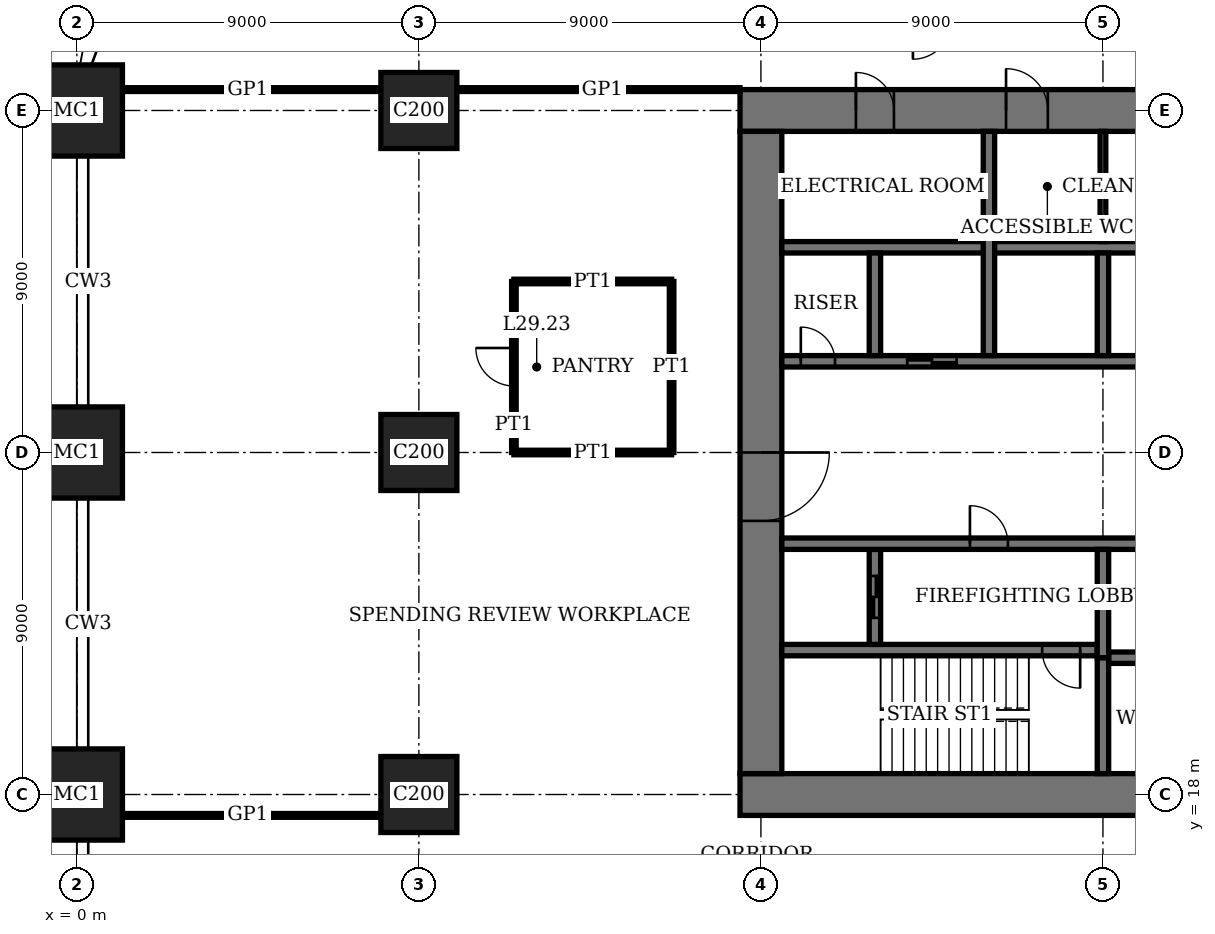
"""IFC4 building model, lengths in metres.
Left out: names, types, materials, properties, quantities, classifications, styles, units other than length and angle.
Written with IfcOpenShell. Run it as: python <this file> out.ifc"""

import sys

from ifc_helpers import new_model, si_unit, direction, frame, frame_2d, origin, origin_2d, place, context, subcontext, project, spatial, rectangle, extrude, element, fill, save


model = new_model("IFC4")
c1 = context("Model", 3, precision=1e-05, world=origin(), true_north=direction((0.0, 1.0)))
c2 = subcontext(c1, "Body", "Model", "MODEL_VIEW")
j1 = project(units=[si_unit("LENGTHUNIT", "METRE"), si_unit("PLANEANGLEUNIT", "RADIAN")], contexts=[c1])
p1 = place(None, origin())
s1 = spatial("IfcSite", under=j1, at=p1, CompositionType="ELEMENT")
p2 = place(p1, origin())
s2 = spatial("IfcBuilding", under=s1, at=p2, CompositionType="ELEMENT")
p3 = place(p2, frame((0.0, 0.0, 121.0)))
s3 = spatial("IfcBuildingStorey", under=s2, at=p3, CompositionType="ELEMENT", Elevation=121.0)
for number, where, z_axis, x_axis in (
    (1, (0.0, 18.0, 0.0), (0.0, 0.0, 1.0), (1.0, 0.0, 0.0)),
    (2, (0.0, 27.0, 0.0), (0.0, 0.0, 1.0), (1.0, 0.0, 0.0)),
    (3, (0.0, 36.0, 0.0), (0.0, 0.0, 1.0), (1.0, 0.0, 0.0)),
):
    element("IfcColumn", number, at=place(p3, frame(where, z_axis=z_axis, x_axis=x_axis)), inside=s3, PredefinedType="COLUMN", context=c2, shape_type="SweptSolid", body=[
        extrude(rectangle(XDim=2.4, YDim=2.4, at=origin_2d()), origin(), (0.0, 0.0, 1.0), 4.0),
    ])
for number, where, z_axis, x_axis in (
    (4, (9.0, 18.0, 0.0), (0.0, 0.0, 1.0), (1.0, 0.0, 0.0)),
    (5, (9.0, 27.0, 0.0), (0.0, 0.0, 1.0), (1.0, 0.0, 0.0)),
    (6, (9.0, 36.0, 0.0), (0.0, 0.0, 1.0), (1.0, 0.0, 0.0)),
):
    element("IfcColumn", number, at=place(p3, frame(where, z_axis=z_axis, x_axis=x_axis)), inside=s3, PredefinedType="COLUMN", context=c2, shape_type="SweptSolid", body=[
        extrude(rectangle(XDim=2.0, YDim=2.0, at=origin_2d()), origin(), (0.0, 0.0, 1.0), 4.0),
    ])
p4 = place(p3, frame((17.45, 18.0, 0.0), z_axis=(0.0, 0.0, 1.0), x_axis=(1.0, 0.0, 0.0)))
e7 = element("IfcWall", 7, at=p4, inside=s3, PredefinedType="SHEAR", context=c2, shape_type="SweptSolid", body=[
    extrude(rectangle(XDim=28.1, YDim=1.1, at=frame_2d((14.05, 0.0))), origin(), (0.0, 0.0, 1.0), 4.0),
])
p5 = place(p4, frame((11.55, 0.0, 0.0)))
e8 = element("IfcOpeningElement", 8, at=p5, cuts=e7, PredefinedType="OPENING", context=c2, shape_type="SweptSolid", body=[
    extrude(rectangle(XDim=1.0, YDim=2.4, at=frame_2d((0.5, 1.2))), frame((0.0, 0.56, 0.0), z_axis=(0.0, -1.0, 0.0), x_axis=(1.0, 0.0, 0.0)), (0.0, 0.0, 1.0), 1.12),
])
p6 = place(p4, frame((16.55, 0.0, 0.0)))
e9 = element("IfcOpeningElement", 9, at=p6, cuts=e7, PredefinedType="OPENING", context=c2, shape_type="SweptSolid", body=[
    extrude(rectangle(XDim=1.0, YDim=2.4, at=frame_2d((0.5, 1.2))), frame((0.0, 0.56, 0.0), z_axis=(0.0, -1.0, 0.0), x_axis=(1.0, 0.0, 0.0)), (0.0, 0.0, 1.0), 1.12),
])
p7 = place(p4, frame((20.0, 0.0, 0.0)))
e10 = element("IfcOpeningElement", 10, at=p7, cuts=e7, PredefinedType="OPENING", context=c2, shape_type="SweptSolid", body=[
    extrude(rectangle(XDim=1.1, YDim=2.4, at=frame_2d((0.55, 1.2))), frame((0.0, 0.56, 0.0), z_axis=(0.0, -1.0, 0.0), x_axis=(1.0, 0.0, 0.0)), (0.0, 0.0, 1.0), 1.12),
])
p8 = place(p4, frame((24.05, 0.0, 0.0)))
e11 = element("IfcOpeningElement", 11, at=p8, cuts=e7, PredefinedType="OPENING", context=c2, shape_type="SweptSolid", body=[
    extrude(rectangle(XDim=1.0, YDim=2.4, at=frame_2d((0.5, 1.2))), frame((0.0, 0.56, 0.0), z_axis=(0.0, -1.0, 0.0), x_axis=(1.0, 0.0, 0.0)), (0.0, 0.0, 1.0), 1.12),
])
p9 = place(p3, frame((45.55, 36.0, 0.0), z_axis=(0.0, 0.0, 1.0), x_axis=(-1.0, 0.0, 0.0)))
e12 = element("IfcWall", 12, at=p9, inside=s3, PredefinedType="SHEAR", context=c2, shape_type="SweptSolid", body=[
    extrude(rectangle(XDim=28.1, YDim=1.1, at=frame_2d((14.05, 0.0))), origin(), (0.0, 0.0, 1.0), 4.0),
])
p10 = place(p9, frame((11.55, 0.0, 0.0)))
e13 = element("IfcOpeningElement", 13, at=p10, cuts=e12, PredefinedType="OPENING", context=c2, shape_type="SweptSolid", body=[
    extrude(rectangle(XDim=1.0, YDim=2.4, at=frame_2d((0.5, 1.2))), frame((0.0, 0.56, 0.0), z_axis=(0.0, -1.0, 0.0), x_axis=(1.0, 0.0, 0.0)), (0.0, 0.0, 1.0), 1.12),
])
p11 = place(p9, frame((16.55, 0.0, 0.0)))
e14 = element("IfcOpeningElement", 14, at=p11, cuts=e12, PredefinedType="OPENING", context=c2, shape_type="SweptSolid", body=[
    extrude(rectangle(XDim=1.0, YDim=2.4, at=frame_2d((0.5, 1.2))), frame((0.0, 0.56, 0.0), z_axis=(0.0, -1.0, 0.0), x_axis=(1.0, 0.0, 0.0)), (0.0, 0.0, 1.0), 1.12),
])
p12 = place(p9, frame((20.0, 0.0, 0.0)))
e15 = element("IfcOpeningElement", 15, at=p12, cuts=e12, PredefinedType="OPENING", context=c2, shape_type="SweptSolid", body=[
    extrude(rectangle(XDim=1.1, YDim=2.4, at=frame_2d((0.55, 1.2))), frame((0.0, 0.56, 0.0), z_axis=(0.0, -1.0, 0.0), x_axis=(1.0, 0.0, 0.0)), (0.0, 0.0, 1.0), 1.12),
])
p13 = place(p9, frame((24.05, 0.0, 0.0)))
e16 = element("IfcOpeningElement", 16, at=p13, cuts=e12, PredefinedType="OPENING", context=c2, shape_type="SweptSolid", body=[
    extrude(rectangle(XDim=1.0, YDim=2.4, at=frame_2d((0.5, 1.2))), frame((0.0, 0.56, 0.0), z_axis=(0.0, -1.0, 0.0), x_axis=(1.0, 0.0, 0.0)), (0.0, 0.0, 1.0), 1.12),
])
p14 = place(p3, frame((18.0, 35.45, 0.0), z_axis=(0.0, 0.0, 1.0), x_axis=(0.0, -1.0, 0.0)))
e17 = element("IfcWall", 17, at=p14, inside=s3, PredefinedType="SHEAR", context=c2, shape_type="SweptSolid", body=[
    extrude(rectangle(XDim=16.9, YDim=1.1, at=frame_2d((8.45, 0.0))), origin(), (0.0, 0.0, 1.0), 4.0),
])
p15 = place(p14, frame((8.45, 0.0, 0.0)))
e18 = element("IfcOpeningElement", 18, at=p15, cuts=e17, PredefinedType="OPENING", context=c2, shape_type="SweptSolid", body=[
    extrude(rectangle(XDim=1.8, YDim=2.4, at=frame_2d((0.9, 1.2))), frame((0.0, 0.56, 0.0), z_axis=(0.0, -1.0, 0.0), x_axis=(1.0, 0.0, 0.0)), (0.0, 0.0, 1.0), 1.12),
])
p16 = place(p3, frame((18.55, 21.8, 0.0), z_axis=(0.0, 0.0, 1.0), x_axis=(1.0, 0.0, 0.0)))
e19 = element("IfcWall", 19, at=p16, inside=s3, PredefinedType="SHEAR", context=c2, shape_type="SweptSolid", body=[
    extrude(rectangle(XDim=8.3, YDim=0.3, at=frame_2d((4.15, 0.0))), origin(), (0.0, 0.0, 1.0), 4.0),
])
p17 = place(p16, frame((6.85, 0.0, 0.0)))
e20 = element("IfcOpeningElement", 20, at=p17, cuts=e19, PredefinedType="OPENING", context=c2, shape_type="SweptSolid", body=[
    extrude(rectangle(XDim=1.0, YDim=2.4, at=frame_2d((0.5, 1.2))), frame((0.0, 0.16, 0.0), z_axis=(0.0, -1.0, 0.0), x_axis=(1.0, 0.0, 0.0)), (0.0, 0.0, 1.0), 0.32),
])
p18 = place(p3, frame((27.0, 18.55, 0.0), z_axis=(0.0, 0.0, 1.0), x_axis=(0.0, 1.0, 0.0)))
e21 = element("IfcWall", 21, at=p18, inside=s3, PredefinedType="SHEAR", context=c2, shape_type="SweptSolid", body=[
    extrude(rectangle(XDim=3.05, YDim=0.3, at=frame_2d((1.525, 0.0))), origin(), (0.0, 0.0, 1.0), 4.0),
])
p19 = place(p3, frame((21.0, 21.95, 0.0), z_axis=(0.0, 0.0, 1.0), x_axis=(0.0, 1.0, 0.0)))
e22 = element("IfcWall", 22, at=p19, inside=s3, PredefinedType="SHEAR", context=c2, shape_type="SweptSolid", body=[
    extrude(rectangle(XDim=2.5, YDim=0.3, at=frame_2d((1.25, 0.0))), origin(), (0.0, 0.0, 1.0), 4.0),
])
p20 = place(p19, frame((0.7, 0.0, 0.0)))
e23 = element("IfcOpeningElement", 23, at=p20, cuts=e22, PredefinedType="OPENING", context=c2, shape_type="SweptSolid", body=[
    extrude(rectangle(XDim=1.1, YDim=2.4, at=frame_2d((0.55, 1.2))), frame((0.0, 0.16, 0.0), z_axis=(0.0, -1.0, 0.0), x_axis=(1.0, 0.0, 0.0)), (0.0, 0.0, 1.0), 0.32),
])
p21 = place(p3, frame((18.55, 24.6, 0.0), z_axis=(0.0, 0.0, 1.0), x_axis=(1.0, 0.0, 0.0)))
e24 = element("IfcWall", 24, at=p21, inside=s3, PredefinedType="SHEAR", context=c2, shape_type="SweptSolid", body=[
    extrude(rectangle(XDim=25.9, YDim=0.3, at=frame_2d((12.95, 0.0))), origin(), (0.0, 0.0, 1.0), 4.0),
])
p22 = place(p21, frame((4.95, 0.0, 0.0)))
e25 = element("IfcOpeningElement", 25, at=p22, cuts=e24, PredefinedType="OPENING", context=c2, shape_type="SweptSolid", body=[
    extrude(rectangle(XDim=1.0, YDim=2.4, at=frame_2d((0.5, 1.2))), frame((0.0, 0.16, 0.0), z_axis=(0.0, -1.0, 0.0), x_axis=(1.0, 0.0, 0.0)), (0.0, 0.0, 1.0), 0.32),
])
p23 = place(p21, frame((24.5, 0.0, 0.0)))
e26 = element("IfcOpeningElement", 26, at=p23, cuts=e24, PredefinedType="OPENING", context=c2, shape_type="SweptSolid", body=[
    extrude(rectangle(XDim=0.9, YDim=2.1, at=frame_2d((0.45, 1.05))), frame((0.0, 0.16, 0.0), z_axis=(0.0, -1.0, 0.0), x_axis=(1.0, 0.0, 0.0)), (0.0, 0.0, 1.0), 0.32),
])
p24 = place(p21, frame((21.3, 0.0, 0.0)))
e27 = element("IfcOpeningElement", 27, at=p24, cuts=e24, PredefinedType="OPENING", context=c2, shape_type="SweptSolid", body=[
    extrude(rectangle(XDim=1.3, YDim=2.4, at=frame_2d((0.65, 1.2))), frame((0.0, 0.16, 0.0), z_axis=(0.0, -1.0, 0.0), x_axis=(1.0, 0.0, 0.0)), (0.0, 0.0, 1.0), 0.32),
])
p25 = place(p3, frame((18.55, 29.4, 0.0), z_axis=(0.0, 0.0, 1.0), x_axis=(1.0, 0.0, 0.0)))
e28 = element("IfcWall", 28, at=p25, inside=s3, PredefinedType="SHEAR", context=c2, shape_type="SweptSolid", body=[
    extrude(rectangle(XDim=25.9, YDim=0.3, at=frame_2d((12.95, 0.0))), origin(), (0.0, 0.0, 1.0), 4.0),
])
p26 = place(p25, frame((19.95, 0.0, 0.0)))
e29 = element("IfcOpeningElement", 29, at=p26, cuts=e28, PredefinedType="OPENING", context=c2, shape_type="SweptSolid", body=[
    extrude(rectangle(XDim=1.0, YDim=2.4, at=frame_2d((0.5, 1.2))), frame((0.0, 0.16, 0.0), z_axis=(0.0, -1.0, 0.0), x_axis=(1.0, 0.0, 0.0)), (0.0, 0.0, 1.0), 0.32),
])
p27 = place(p25, frame((0.5, 0.0, 0.0)))
e30 = element("IfcOpeningElement", 30, at=p27, cuts=e28, PredefinedType="OPENING", context=c2, shape_type="SweptSolid", body=[
    extrude(rectangle(XDim=0.9, YDim=2.1, at=frame_2d((0.45, 1.05))), frame((0.0, 0.16, 0.0), z_axis=(0.0, -1.0, 0.0), x_axis=(1.0, 0.0, 0.0)), (0.0, 0.0, 1.0), 0.32),
])
p28 = place(p25, frame((15.4, 0.0, 0.0)))
e31 = element("IfcOpeningElement", 31, at=p28, cuts=e28, PredefinedType="OPENING", context=c2, shape_type="SweptSolid", body=[
    extrude(rectangle(XDim=1.1, YDim=2.4, at=frame_2d((0.55, 1.2))), frame((0.0, 0.16, 0.0), z_axis=(0.0, -1.0, 0.0), x_axis=(1.0, 0.0, 0.0)), (0.0, 0.0, 1.0), 0.32),
])
p29 = place(p25, frame((12.4, 0.0, 0.0)))
e32 = element("IfcOpeningElement", 32, at=p29, cuts=e28, PredefinedType="OPENING", context=c2, shape_type="SweptSolid", body=[
    extrude(rectangle(XDim=1.1, YDim=2.4, at=frame_2d((0.55, 1.2))), frame((0.0, 0.16, 0.0), z_axis=(0.0, -1.0, 0.0), x_axis=(1.0, 0.0, 0.0)), (0.0, 0.0, 1.0), 0.32),
])
p30 = place(p25, frame((3.3, 0.0, 0.0)))
e33 = element("IfcOpeningElement", 33, at=p30, cuts=e28, PredefinedType="OPENING", context=c2, shape_type="SweptSolid", body=[
    extrude(rectangle(XDim=1.3, YDim=2.4, at=frame_2d((0.65, 1.2))), frame((0.0, 0.16, 0.0), z_axis=(0.0, -1.0, 0.0), x_axis=(1.0, 0.0, 0.0)), (0.0, 0.0, 1.0), 0.32),
])
for number, where, z_axis, x_axis in (
    (34, (27.15, 21.6, 0.0), (0.0, 0.0, 1.0), (1.0, 0.0, 0.0)),
    (35, (18.55, 32.4, 0.0), (0.0, 0.0, 1.0), (1.0, 0.0, 0.0)),
):
    element("IfcWall", number, at=place(p3, frame(where, z_axis=z_axis, x_axis=x_axis)), inside=s3, PredefinedType="SHEAR", context=c2, shape_type="SweptSolid", body=[
        extrude(rectangle(XDim=17.3, YDim=0.3, at=frame_2d((8.65, 0.0))), origin(), (0.0, 0.0, 1.0), 4.0),
    ])
p31 = place(p3, frame((27.0, 29.55, 0.0), z_axis=(0.0, 0.0, 1.0), x_axis=(0.0, 1.0, 0.0)))
e36 = element("IfcWall", 36, at=p31, inside=s3, PredefinedType="SHEAR", context=c2, shape_type="SweptSolid", body=[
    extrude(rectangle(XDim=2.7, YDim=0.3, at=frame_2d((1.35, 0.0))), origin(), (0.0, 0.0, 1.0), 4.0),
])
p32 = place(p3, frame((24.0, 29.55, 0.0), z_axis=(0.0, 0.0, 1.0), x_axis=(0.0, 1.0, 0.0)))
e37 = element("IfcWall", 37, at=p32, inside=s3, PredefinedType="SHEAR", context=c2, shape_type="SweptSolid", body=[
    extrude(rectangle(XDim=5.9, YDim=0.3, at=frame_2d((2.95, 0.0))), origin(), (0.0, 0.0, 1.0), 4.0),
])
p33 = place(p3, frame((21.0, 29.55, 0.0), z_axis=(0.0, 0.0, 1.0), x_axis=(0.0, 1.0, 0.0)))
e38 = element("IfcWall", 38, at=p33, inside=s3, PredefinedType="SHEAR", context=c2, shape_type="SweptSolid", body=[
    extrude(rectangle(XDim=2.7, YDim=0.3, at=frame_2d((1.35, 0.0))), origin(), (0.0, 0.0, 1.0), 4.0),
])
p34 = place(p3, frame((27.0, 21.6, 0.0), z_axis=(0.0, 0.0, 1.0), x_axis=(0.0, 1.0, 0.0)))
e39 = element("IfcWall", 39, at=p34, inside=s3, PredefinedType="SHEAR", context=c2, shape_type="SweptSolid", body=[
    extrude(rectangle(XDim=2.85, YDim=0.3, at=frame_2d((1.425, 0.0))), origin(), (0.0, 0.0, 1.0), 4.0),
])
p35 = place(p3, frame((1.2, 17.45, 0.0), z_axis=(0.0, 0.0, 1.0), x_axis=(1.0, 0.0, 0.0)))
e40 = element("IfcWall", 40, at=p35, inside=s3, PredefinedType="PARTITIONING", context=c2, shape_type="SweptSolid", body=[
    extrude(rectangle(XDim=6.8, YDim=0.1, at=frame_2d((3.4, 0.0))), origin(), (0.0, 0.0, 1.0), 3.75),
])
p36 = place(p3, frame((11.5, 27.0, 0.0), z_axis=(0.0, 0.0, 1.0), x_axis=(1.0, 0.0, 0.0)))
e41 = element("IfcWall", 41, at=p36, inside=s3, PredefinedType="PARTITIONING", context=c2, shape_type="SweptSolid", body=[
    extrude(rectangle(XDim=4.15, YDim=0.12, at=frame_2d((2.075, 0.0))), origin(), (0.0, 0.0, 1.0), 3.05),
])
p37 = place(p3, frame((11.5, 31.5, 0.0), z_axis=(0.0, 0.0, 1.0), x_axis=(1.0, 0.0, 0.0)))
e42 = element("IfcWall", 42, at=p37, inside=s3, PredefinedType="PARTITIONING", context=c2, shape_type="SweptSolid", body=[
    extrude(rectangle(XDim=4.15, YDim=0.12, at=frame_2d((2.075, 0.0))), origin(), (0.0, 0.0, 1.0), 3.1),
])
p38 = place(p3, frame((1.2, 36.55, 0.0), z_axis=(0.0, 0.0, 1.0), x_axis=(1.0, 0.0, 0.0)))
e43 = element("IfcWall", 43, at=p38, inside=s3, PredefinedType="PARTITIONING", context=c2, shape_type="SweptSolid", body=[
    extrude(rectangle(XDim=6.8, YDim=0.1, at=frame_2d((3.4, 0.0))), origin(), (0.0, 0.0, 1.0), 3.75),
])
p39 = place(p3, frame((10.0, 36.55, 0.0), z_axis=(0.0, 0.0, 1.0), x_axis=(1.0, 0.0, 0.0)))
e44 = element("IfcWall", 44, at=p39, inside=s3, PredefinedType="PARTITIONING", context=c2, shape_type="SweptSolid", body=[
    extrude(rectangle(XDim=7.45, YDim=0.1, at=frame_2d((3.725, 0.0))), origin(), (0.0, 0.0, 1.0), 3.75),
])
p40 = place(p3, frame((11.5, 27.0, 0.0), z_axis=(0.0, 0.0, 1.0), x_axis=(0.0, 1.0, 0.0)))
e45 = element("IfcWall", 45, at=p40, inside=s3, PredefinedType="PARTITIONING", context=c2, shape_type="SweptSolid", body=[
    extrude(rectangle(XDim=4.5, YDim=0.12, at=frame_2d((2.25, 0.0))), origin(), (0.0, 0.0, 1.0), 3.75),
])
p41 = place(p40, frame((1.75, 0.0, 0.0)))
e46 = element("IfcOpeningElement", 46, at=p41, cuts=e45, PredefinedType="OPENING", context=c2, shape_type="SweptSolid", body=[
    extrude(rectangle(XDim=1.0, YDim=2.4, at=frame_2d((0.5, 1.2))), frame((0.0, 0.07, 0.0), z_axis=(0.0, -1.0, 0.0), x_axis=(1.0, 0.0, 0.0)), (0.0, 0.0, 1.0), 0.14),
])
p42 = place(p3, frame((15.65, 27.0, 0.0), z_axis=(0.0, 0.0, 1.0), x_axis=(0.0, 1.0, 0.0)))
e47 = element("IfcWall", 47, at=p42, inside=s3, PredefinedType="PARTITIONING", context=c2, shape_type="SweptSolid", body=[
    extrude(rectangle(XDim=4.5, YDim=0.12, at=frame_2d((2.25, 0.0))), origin(), (0.0, 0.0, 1.0), 3.75),
])
p43 = place(p3, frame((27.0, 32.55, 0.0), z_axis=(0.0, 0.0, 1.0), x_axis=(0.0, 1.0, 0.0)))
e48 = element("IfcWall", 48, at=p43, inside=s3, PredefinedType="PARTITIONING", context=c2, shape_type="SweptSolid", body=[
    extrude(rectangle(XDim=2.9, YDim=0.15, at=frame_2d((1.45, 0.0))), origin(), (0.0, 0.0, 1.0), 3.75),
])
p44 = place(p15, origin())
e49 = element("IfcDoor", 49, at=p44, inside=s3, OperationType="DOUBLE_DOOR_DOUBLE_SWING", PredefinedType="DOOR", context=c2, shape_type="SweptSolid", body=[
    extrude(rectangle(XDim=1.8, YDim=2.4, at=frame_2d((0.9, 1.2))), frame((0.0, 0.03, 0.0), z_axis=(0.0, -1.0, 0.0), x_axis=(1.0, 0.0, 0.0)), (0.0, 0.0, 1.0), 0.06),
    extrude(rectangle(XDim=0.04, YDim=2.4, at=frame_2d((0.02, 1.2))), frame((0.0, 0.55, 0.0), z_axis=(0.0, -1.0, 0.0), x_axis=(1.0, 0.0, 0.0)), (0.0, 0.0, 1.0), 1.1),
    extrude(rectangle(XDim=0.04, YDim=2.4, at=frame_2d((1.78, 1.2))), frame((0.0, 0.55, 0.0), z_axis=(0.0, -1.0, 0.0), x_axis=(1.0, 0.0, 0.0)), (0.0, 0.0, 1.0), 1.1),
    extrude(rectangle(XDim=1.8, YDim=0.04, at=frame_2d((0.9, 2.38))), frame((0.0, 0.55, 0.0), z_axis=(0.0, -1.0, 0.0), x_axis=(1.0, 0.0, 0.0)), (0.0, 0.0, 1.0), 1.1),
])
fill(e18, e49)
p45 = place(p12, origin())
e50 = element("IfcDoor", 50, at=p45, inside=s3, OperationType="SINGLE_SWING_RIGHT", PredefinedType="DOOR", context=c2, shape_type="SweptSolid", body=[
    extrude(rectangle(XDim=1.1, YDim=2.4, at=frame_2d((0.55, 1.2))), frame((0.0, 0.025, 0.0), z_axis=(0.0, -1.0, 0.0), x_axis=(1.0, 0.0, 0.0)), (0.0, 0.0, 1.0), 0.05),
    extrude(rectangle(XDim=0.04, YDim=2.4, at=frame_2d((0.02, 1.2))), frame((0.0, 0.44, 0.0), z_axis=(0.0, -1.0, 0.0), x_axis=(1.0, 0.0, 0.0)), (0.0, 0.0, 1.0), 0.88),
    extrude(rectangle(XDim=0.04, YDim=2.4, at=frame_2d((1.08, 1.2))), frame((0.0, 0.44, 0.0), z_axis=(0.0, -1.0, 0.0), x_axis=(1.0, 0.0, 0.0)), (0.0, 0.0, 1.0), 0.88),
    extrude(rectangle(XDim=1.1, YDim=0.04, at=frame_2d((0.55, 2.38))), frame((0.0, 0.44, 0.0), z_axis=(0.0, -1.0, 0.0), x_axis=(1.0, 0.0, 0.0)), (0.0, 0.0, 1.0), 0.88),
])
fill(e15, e50)
p46 = place(p13, origin())
e51 = element("IfcDoor", 51, at=p46, inside=s3, OperationType="SINGLE_SWING_RIGHT", PredefinedType="DOOR", context=c2, shape_type="SweptSolid", body=[
    extrude(rectangle(XDim=1.0, YDim=2.4, at=frame_2d((0.5, 1.2))), frame((0.0, 0.025, 0.0), z_axis=(0.0, -1.0, 0.0), x_axis=(1.0, 0.0, 0.0)), (0.0, 0.0, 1.0), 0.05),
    extrude(rectangle(XDim=0.04, YDim=2.4, at=frame_2d((0.02, 1.2))), frame((0.0, 0.4, 0.0), z_axis=(0.0, -1.0, 0.0), x_axis=(1.0, 0.0, 0.0)), (0.0, 0.0, 1.0), 0.8),
    extrude(rectangle(XDim=0.04, YDim=2.4, at=frame_2d((0.98, 1.2))), frame((0.0, 0.4, 0.0), z_axis=(0.0, -1.0, 0.0), x_axis=(1.0, 0.0, 0.0)), (0.0, 0.0, 1.0), 0.8),
    extrude(rectangle(XDim=1.0, YDim=0.04, at=frame_2d((0.5, 2.38))), frame((0.0, 0.4, 0.0), z_axis=(0.0, -1.0, 0.0), x_axis=(1.0, 0.0, 0.0)), (0.0, 0.0, 1.0), 0.8),
])
fill(e16, e51)
p47 = place(p17, origin())
e52 = element("IfcDoor", 52, at=p47, inside=s3, OperationType="SINGLE_SWING_RIGHT", PredefinedType="DOOR", context=c2, shape_type="SweptSolid", body=[
    extrude(rectangle(XDim=1.0, YDim=2.4, at=frame_2d((0.5, 1.2))), frame((0.0, 0.03, 0.0), z_axis=(0.0, -1.0, 0.0), x_axis=(1.0, 0.0, 0.0)), (0.0, 0.0, 1.0), 0.06),
])
fill(e20, e52)
p48 = place(p22, origin())
e53 = element("IfcDoor", 53, at=p48, inside=s3, OperationType="SINGLE_SWING_RIGHT", PredefinedType="DOOR", context=c2, shape_type="SweptSolid", body=[
    extrude(rectangle(XDim=1.0, YDim=2.4, at=frame_2d((0.5, 1.2))), frame((0.0, 0.03, 0.0), z_axis=(0.0, -1.0, 0.0), x_axis=(1.0, 0.0, 0.0)), (0.0, 0.0, 1.0), 0.06),
])
fill(e25, e53)
p49 = place(p27, origin())
e54 = element("IfcDoor", 54, at=p49, inside=s3, OperationType="SINGLE_SWING_RIGHT", PredefinedType="DOOR", context=c2, shape_type="SweptSolid", body=[
    extrude(rectangle(XDim=0.9, YDim=2.1, at=frame_2d((0.45, 1.05))), frame((0.0, 0.03, 0.0), z_axis=(0.0, -1.0, 0.0), x_axis=(1.0, 0.0, 0.0)), (0.0, 0.0, 1.0), 0.06),
])
fill(e30, e54)
p50 = place(p41, origin())
e55 = element("IfcDoor", 55, at=p50, inside=s3, OperationType="SINGLE_SWING_LEFT", PredefinedType="DOOR", context=c2, shape_type="SweptSolid", body=[
    extrude(rectangle(XDim=1.0, YDim=2.4, at=frame_2d((0.5, 1.2))), frame((0.0, 0.025, 0.0), z_axis=(0.0, -1.0, 0.0), x_axis=(1.0, 0.0, 0.0)), (0.0, 0.0, 1.0), 0.05),
])
fill(e46, e55)
p51 = place(p30, origin())
e56 = element("IfcDoor", 56, at=p51, inside=s3, OperationType="DOUBLE_DOOR_SLIDING", PredefinedType="DOOR", context=c2, shape_type="SweptSolid", body=[
    extrude(rectangle(XDim=1.3, YDim=2.4, at=frame_2d((0.65, 1.2))), frame((0.0, 0.02, 0.0), z_axis=(0.0, -1.0, 0.0), x_axis=(1.0, 0.0, 0.0)), (0.0, 0.0, 1.0), 0.04),
])
fill(e33, e56)
p52 = place(p20, origin())
e57 = element("IfcDoor", 57, at=p52, inside=s3, OperationType="DOUBLE_DOOR_SLIDING", PredefinedType="DOOR", context=c2, shape_type="SweptSolid", body=[
    extrude(rectangle(XDim=1.1, YDim=2.4, at=frame_2d((0.55, 1.2))), frame((0.0, 0.03, 0.0), z_axis=(0.0, -1.0, 0.0), x_axis=(1.0, 0.0, 0.0)), (0.0, 0.0, 1.0), 0.06),
])
fill(e23, e57)
save(model, sys.argv[1])
